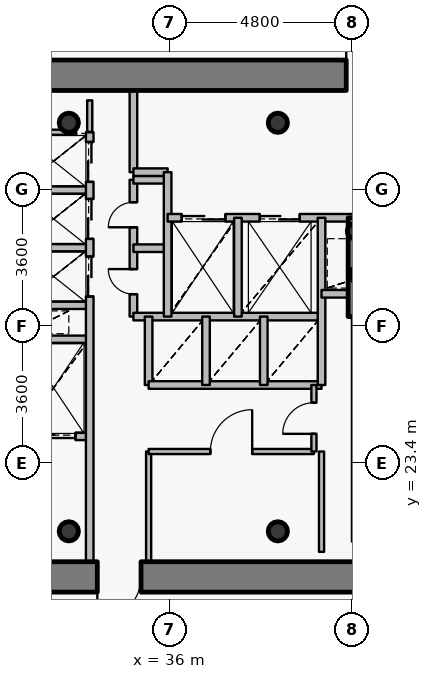
"""IFC4 building model, lengths in metres.
Left out: names, types, materials, properties, quantities, classifications, styles, units other than length and angle.
Written with IfcOpenShell. Run it as: python <this file> out.ifc"""

import sys

from ifc_helpers import new_model, si_unit, direction, frame, frame_2d, origin, origin_2d, place, context, subcontext, project, spatial, rectangle, hollow_circle, extrude, source, transform, mapped, element, fill, save


model = new_model("IFC4")
c1 = context("Model", 3, precision=1e-05, world=origin(), true_north=direction((0.0, 1.0)))
c2 = subcontext(c1, "Body", "Model", "MODEL_VIEW")
j1 = project(units=[si_unit("LENGTHUNIT", "METRE"), si_unit("PLANEANGLEUNIT", "RADIAN")], contexts=[c1])
p1 = place(None, origin())
s1 = spatial("IfcSite", under=j1, at=p1, CompositionType="ELEMENT")
p2 = place(p1, origin())
s2 = spatial("IfcBuilding", under=s1, at=p2, CompositionType="ELEMENT")
p3 = place(p2, frame((0.0, 0.0, 189.9)))
s3 = spatial("IfcBuildingStorey", under=s2, at=p3, CompositionType="ELEMENT", Elevation=189.9)
for number, where, z_axis, x_axis in (
    (1, (33.35, 21.6, 0.0), (0.0, 0.0, 1.0), (1.0, 0.0, 0.0)),
    (2, (38.85, 21.6, 0.0), (0.0, 0.0, 1.0), (1.0, 0.0, 0.0)),
    (3, (38.85, 32.35, 0.0), (0.0, 0.0, 1.0), (1.0, 0.0, 0.0)),
    (4, (33.35, 32.35, 0.0), (0.0, 0.0, 1.0), (1.0, 0.0, 0.0)),
):
    element("IfcColumn", number, at=place(p3, frame(where, z_axis=z_axis, x_axis=x_axis)), inside=s3, PredefinedType="COLUMN", context=c2, shape_type="SweptSolid", body=[
        extrude(hollow_circle(Radius=0.254, WallThickness=0.02, at=origin_2d()), origin(), (0.0, 0.0, 1.0), 3.75),
    ])
for number, where, z_axis, x_axis in (
    (5, (40.95, 28.35, 0.0), (0.0, 0.0, 1.0), (1.0, 0.0, 0.0)),
    (6, (40.88, 29.5, 0.0), (0.0, 0.0, 1.0), (1.0, 0.0, 0.0)),
):
    element("IfcColumn", number, at=place(p3, frame(where, z_axis=z_axis, x_axis=x_axis)), inside=s3, PredefinedType="COLUMN", context=c2, shape_type="SweptSolid", body=[
        extrude(hollow_circle(Radius=0.203, WallThickness=0.016, at=origin_2d()), origin(), (0.0, 0.0, 1.0), 3.75),
    ])
p4 = place(p3, frame((27.2, 33.6, 0.0), z_axis=(0.0, 0.0, 1.0), x_axis=(1.0, 0.0, 0.0)))
e7 = element("IfcWall", 7, at=p4, inside=s3, PredefinedType="SHEAR", context=c2, shape_type="SweptSolid", body=[
    extrude(rectangle(XDim=17.6, YDim=0.8, at=frame_2d((8.8, 0.0))), origin(), (0.0, 0.0, 1.0), 2.95),
])
p5 = place(p4, frame((13.45, 0.0, 0.0)))
e8 = element("IfcOpeningElement", 8, at=p5, cuts=e7, PredefinedType="OPENING", context=c2, shape_type="SweptSolid", body=[
    extrude(rectangle(XDim=1.15, YDim=2.15, at=origin_2d()), frame((0.575, 0.41, 1.075), z_axis=(0.0, -1.0, 0.0), x_axis=(1.0, 0.0, 0.0)), (0.0, 0.0, 1.0), 0.82),
])
p6 = place(p3, frame((44.8, 20.4, 0.0), z_axis=(0.0, 0.0, 1.0), x_axis=(-1.0, 0.0, 0.0)))
e9 = element("IfcWall", 9, at=p6, inside=s3, PredefinedType="SHEAR", context=c2, shape_type="SweptSolid", body=[
    extrude(rectangle(XDim=17.6, YDim=0.8, at=frame_2d((8.8, 0.0))), origin(), (0.0, 0.0, 1.0), 2.95),
])
p7 = place(p6, frame((9.55, 0.0, 0.0)))
e10 = element("IfcOpeningElement", 10, at=p7, cuts=e9, PredefinedType="OPENING", context=c2, shape_type="SweptSolid", body=[
    extrude(rectangle(XDim=1.15, YDim=2.15, at=origin_2d()), frame((0.575, 0.41, 1.075), z_axis=(0.0, -1.0, 0.0), x_axis=(1.0, 0.0, 0.0)), (0.0, 0.0, 1.0), 0.82),
])
p8 = place(p3, frame((40.9, 27.25, 0.0), z_axis=(0.0, 0.0, 1.0), x_axis=(0.0, 1.0, 0.0)))
e11 = element("IfcWall", 11, at=p8, inside=s3, PredefinedType="SHEAR", context=c2, shape_type="SweptSolid", body=[
    extrude(rectangle(XDim=2.6, YDim=0.4, at=frame_2d((1.3, 0.0))), origin(), (0.0, 0.0, 1.0), 3.1),
])
p9 = place(p3, frame((32.0, 24.1, 0.0), z_axis=(0.0, 0.0, 1.0), x_axis=(1.0, 0.0, 0.0)))
e12 = element("IfcWall", 12, at=p9, inside=s3, PredefinedType="PARTITIONING", context=c2, shape_type="SweptSolid", body=[
    extrude(rectangle(XDim=1.9, YDim=0.2, at=frame_2d((0.95, 0.0))), origin(), (0.0, 0.0, 1.0), 3.085),
])
p10 = place(p9, frame((0.375, 0.0, 0.0)))
e13 = element("IfcOpeningElement", 13, at=p10, cuts=e12, PredefinedType="OPENING", context=c2, shape_type="SweptSolid", body=[
    extrude(rectangle(XDim=1.15, YDim=2.15, at=origin_2d()), frame((0.575, 0.11, 1.075), z_axis=(0.0, -1.0, 0.0), x_axis=(1.0, 0.0, 0.0)), (0.0, 0.0, 1.0), 0.22),
])
for number, where, z_axis, x_axis in (
    (14, (32.0, 26.65, 0.0), (0.0, 0.0, 1.0), (1.0, 0.0, 0.0)),
    (15, (32.0, 27.55, 0.0), (0.0, 0.0, 1.0), (1.0, 0.0, 0.0)),
    (16, (32.0, 29.06, 0.0), (0.0, 0.0, 1.0), (1.0, 0.0, 0.0)),
    (17, (32.0, 30.58, 0.0), (0.0, 0.0, 1.0), (1.0, 0.0, 0.0)),
):
    element("IfcWall", number, at=place(p3, frame(where, z_axis=z_axis, x_axis=x_axis)), inside=s3, PredefinedType="PARTITIONING", context=c2, shape_type="SweptSolid", body=[
        extrude(rectangle(XDim=1.9, YDim=0.2, at=frame_2d((0.95, 0.0))), origin(), (0.0, 0.0, 1.0), 3.085),
    ])
p11 = place(p3, frame((33.9, 20.8, 0.0), z_axis=(0.0, 0.0, 1.0), x_axis=(0.0, 1.0, 0.0)))
e18 = element("IfcWall", 18, at=p11, inside=s3, PredefinedType="PARTITIONING", context=c2, shape_type="SweptSolid", body=[
    extrude(rectangle(XDim=11.3, YDim=0.2, at=frame_2d((5.65, 0.0))), origin(), (0.0, 0.0, 1.0), 3.085),
])
p12 = place(p11, frame((6.98, 0.0, 0.0)))
e19 = element("IfcOpeningElement", 19, at=p12, cuts=e18, PredefinedType="OPENING", context=c2, shape_type="SweptSolid", body=[
    extrude(rectangle(XDim=1.05, YDim=2.15, at=origin_2d()), frame((0.525, 0.11, 1.075), z_axis=(0.0, -1.0, 0.0), x_axis=(1.0, 0.0, 0.0)), (0.0, 0.0, 1.0), 0.22),
])
p13 = place(p11, frame((8.495, 0.0, 0.0)))
e20 = element("IfcOpeningElement", 20, at=p13, cuts=e18, PredefinedType="OPENING", context=c2, shape_type="SweptSolid", body=[
    extrude(rectangle(XDim=1.05, YDim=2.15, at=origin_2d()), frame((0.525, 0.11, 1.075), z_axis=(0.0, -1.0, 0.0), x_axis=(1.0, 0.0, 0.0)), (0.0, 0.0, 1.0), 0.22),
])
p14 = place(p11, frame((9.995, 0.0, 0.0)))
e21 = element("IfcOpeningElement", 21, at=p14, cuts=e18, PredefinedType="OPENING", context=c2, shape_type="SweptSolid", body=[
    extrude(rectangle(XDim=1.05, YDim=2.15, at=origin_2d()), frame((0.525, 0.11, 1.075), z_axis=(0.0, -1.0, 0.0), x_axis=(1.0, 0.0, 0.0)), (0.0, 0.0, 1.0), 0.22),
])
p15 = place(p3, frame((35.05, 27.25, 0.0), z_axis=(0.0, 0.0, 1.0), x_axis=(0.0, 1.0, 0.0)))
e22 = element("IfcWall", 22, at=p15, inside=s3, PredefinedType="PARTITIONING", context=c2, shape_type="SweptSolid", body=[
    extrude(rectangle(XDim=3.6, YDim=0.2, at=frame_2d((1.8, 0.0))), origin(), (0.0, 0.0, 1.0), 3.5),
])
p16 = place(p15, frame((0.59, 0.0, 0.0)))
e23 = element("IfcOpeningElement", 23, at=p16, cuts=e22, PredefinedType="OPENING", context=c2, shape_type="SweptSolid", body=[
    extrude(rectangle(XDim=0.66, YDim=2.05, at=origin_2d()), frame((0.33, 0.11, 1.025), z_axis=(0.0, -1.0, 0.0), x_axis=(1.0, 0.0, 0.0)), (0.0, 0.0, 1.0), 0.22),
])
p17 = place(p15, frame((2.35, 0.0, 0.0)))
e24 = element("IfcOpeningElement", 24, at=p17, cuts=e22, PredefinedType="OPENING", context=c2, shape_type="SweptSolid", body=[
    extrude(rectangle(XDim=0.66, YDim=2.05, at=origin_2d()), frame((0.33, 0.11, 1.025), z_axis=(0.0, -1.0, 0.0), x_axis=(1.0, 0.0, 0.0)), (0.0, 0.0, 1.0), 0.22),
])
p18 = place(p3, frame((35.05, 27.25, 0.0), z_axis=(0.0, 0.0, 1.0), x_axis=(1.0, 0.0, 0.0)))
e25 = element("IfcWall", 25, at=p18, inside=s3, PredefinedType="PARTITIONING", context=c2, shape_type="SweptSolid", body=[
    extrude(rectangle(XDim=4.95, YDim=0.2, at=frame_2d((2.475, 0.0))), origin(), (0.0, 0.0, 1.0), 3.085),
])
for number, where, z_axis, x_axis in (
    (26, (35.05, 29.05, 0.0), (0.0, 0.0, 1.0), (1.0, 0.0, 0.0)),
    (27, (35.05, 30.85, 0.0), (0.0, 0.0, 1.0), (1.0, 0.0, 0.0)),
):
    element("IfcWall", number, at=place(p3, frame(where, z_axis=z_axis, x_axis=x_axis)), inside=s3, PredefinedType="PARTITIONING", context=c2, shape_type="SweptSolid", body=[
        extrude(rectangle(XDim=0.9, YDim=0.2, at=frame_2d((0.45, 0.0))), origin(), (0.0, 0.0, 1.0), 3.5),
    ])
p19 = place(p3, frame((35.05, 31.05, 0.0), z_axis=(0.0, 0.0, 1.0), x_axis=(0.0, 1.0, 0.0)))
e28 = element("IfcWall", 28, at=p19, inside=s3, PredefinedType="PARTITIONING", context=c2, shape_type="SweptSolid", body=[
    extrude(rectangle(XDim=2.15, YDim=0.2, at=frame_2d((1.075, 0.0))), origin(), (0.0, 0.0, 1.0), 3.085),
])
p20 = place(p3, frame((35.05, 31.05, 0.0), z_axis=(0.0, 0.0, 1.0), x_axis=(1.0, 0.0, 0.0)))
e29 = element("IfcWall", 29, at=p20, inside=s3, PredefinedType="PARTITIONING", context=c2, shape_type="SweptSolid", body=[
    extrude(rectangle(XDim=0.9, YDim=0.2, at=frame_2d((0.45, 0.0))), origin(), (0.0, 0.0, 1.0), 3.5),
])
p21 = place(p3, frame((35.45, 20.8, 0.0), z_axis=(0.0, 0.0, 1.0), x_axis=(0.0, 1.0, 0.0)))
e30 = element("IfcWall", 30, at=p21, inside=s3, PredefinedType="PARTITIONING", context=c2, shape_type="SweptSolid", body=[
    extrude(rectangle(XDim=2.9, YDim=0.135, at=frame_2d((1.45, 0.0))), origin(), (0.0, 0.0, 1.0), 3.085),
])
p22 = place(p3, frame((35.45, 23.7, 0.0), z_axis=(0.0, 0.0, 1.0), x_axis=(1.0, 0.0, 0.0)))
e31 = element("IfcWall", 31, at=p22, inside=s3, PredefinedType="PARTITIONING", context=c2, shape_type="SweptSolid", body=[
    extrude(rectangle(XDim=4.35, YDim=0.135, at=frame_2d((2.175, 0.0))), origin(), (0.0, 0.0, 1.0), 3.085),
])
p23 = place(p22, frame((1.625, 0.0, 0.0)))
e32 = element("IfcOpeningElement", 32, at=p23, cuts=e31, PredefinedType="OPENING", context=c2, shape_type="SweptSolid", body=[
    extrude(rectangle(XDim=1.1, YDim=2.15, at=origin_2d()), frame((0.55, 0.078, 1.075), z_axis=(0.0, -1.0, 0.0), x_axis=(1.0, 0.0, 0.0)), (0.0, 0.0, 1.0), 0.155),
])
p24 = place(p3, frame((35.45, 25.45, 0.0), z_axis=(0.0, 0.0, 1.0), x_axis=(0.0, 1.0, 0.0)))
e33 = element("IfcWall", 33, at=p24, inside=s3, PredefinedType="PARTITIONING", context=c2, shape_type="SweptSolid", body=[
    extrude(rectangle(XDim=1.8, YDim=0.2, at=frame_2d((0.9, 0.0))), origin(), (0.0, 0.0, 1.0), 3.5),
])
p25 = place(p3, frame((35.45, 25.45, 0.0), z_axis=(0.0, 0.0, 1.0), x_axis=(1.0, 0.0, 0.0)))
e34 = element("IfcWall", 34, at=p25, inside=s3, PredefinedType="PARTITIONING", context=c2, shape_type="SweptSolid", body=[
    extrude(rectangle(XDim=4.55, YDim=0.2, at=frame_2d((2.275, 0.0))), origin(), (0.0, 0.0, 1.0), 3.085),
])
p26 = place(p3, frame((35.95, 27.25, 0.0), z_axis=(0.0, 0.0, 1.0), x_axis=(0.0, 1.0, 0.0)))
e35 = element("IfcWall", 35, at=p26, inside=s3, PredefinedType="PARTITIONING", context=c2, shape_type="SweptSolid", body=[
    extrude(rectangle(XDim=3.8, YDim=0.2, at=frame_2d((1.9, 0.0))), origin(), (0.0, 0.0, 1.0), 3.5),
])
p27 = place(p3, frame((35.95, 29.85, 0.0), z_axis=(0.0, 0.0, 1.0), x_axis=(1.0, 0.0, 0.0)))
e36 = element("IfcWall", 36, at=p27, inside=s3, PredefinedType="PARTITIONING", context=c2, shape_type="SweptSolid", body=[
    extrude(rectangle(XDim=8.49, YDim=0.2, at=frame_2d((4.245, 0.0))), origin(), (0.0, 0.0, 1.0), 3.085),
])
p28 = place(p27, frame((6.1, 0.0, 0.0)))
e37 = element("IfcOpeningElement", 37, at=p28, cuts=e36, PredefinedType="OPENING", context=c2, shape_type="SweptSolid", body=[
    extrude(rectangle(XDim=1.2, YDim=2.15, at=origin_2d()), frame((0.6, 0.11, 1.075), z_axis=(0.0, -1.0, 0.0), x_axis=(1.0, 0.0, 0.0)), (0.0, 0.0, 1.0), 0.22),
])
p29 = place(p27, frame((0.37, 0.0, 0.0)))
e38 = element("IfcOpeningElement", 38, at=p29, cuts=e36, PredefinedType="OPENING", context=c2, shape_type="SweptSolid", body=[
    extrude(rectangle(XDim=1.15, YDim=2.15, at=origin_2d()), frame((0.575, 0.11, 1.075), z_axis=(0.0, -1.0, 0.0), x_axis=(1.0, 0.0, 0.0)), (0.0, 0.0, 1.0), 0.22),
])
p30 = place(p27, frame((2.425, 0.0, 0.0)))
e39 = element("IfcOpeningElement", 39, at=p30, cuts=e36, PredefinedType="OPENING", context=c2, shape_type="SweptSolid", body=[
    extrude(rectangle(XDim=1.05, YDim=2.15, at=origin_2d()), frame((0.525, 0.11, 1.075), z_axis=(0.0, -1.0, 0.0), x_axis=(1.0, 0.0, 0.0)), (0.0, 0.0, 1.0), 0.22),
])
p31 = place(p3, frame((36.96, 25.45, 0.0), z_axis=(0.0, 0.0, 1.0), x_axis=(0.0, 1.0, 0.0)))
e40 = element("IfcWall", 40, at=p31, inside=s3, PredefinedType="PARTITIONING", context=c2, shape_type="SweptSolid", body=[
    extrude(rectangle(XDim=1.8, YDim=0.2, at=frame_2d((0.9, 0.0))), origin(), (0.0, 0.0, 1.0), 3.5),
])
p32 = place(p3, frame((37.8, 27.25, 0.0), z_axis=(0.0, 0.0, 1.0), x_axis=(0.0, 1.0, 0.0)))
e41 = element("IfcWall", 41, at=p32, inside=s3, PredefinedType="PARTITIONING", context=c2, shape_type="SweptSolid", body=[
    extrude(rectangle(XDim=2.6, YDim=0.2, at=frame_2d((1.3, 0.0))), origin(), (0.0, 0.0, 1.0), 3.5),
])
p33 = place(p3, frame((38.48, 25.45, 0.0), z_axis=(0.0, 0.0, 1.0), x_axis=(0.0, 1.0, 0.0)))
e42 = element("IfcWall", 42, at=p33, inside=s3, PredefinedType="PARTITIONING", context=c2, shape_type="SweptSolid", body=[
    extrude(rectangle(XDim=1.8, YDim=0.2, at=frame_2d((0.9, 0.0))), origin(), (0.0, 0.0, 1.0), 3.5),
])
p34 = place(p3, frame((39.8, 23.7, 0.0), z_axis=(0.0, 0.0, 1.0), x_axis=(0.0, 1.0, 0.0)))
e43 = element("IfcWall", 43, at=p34, inside=s3, PredefinedType="PARTITIONING", context=c2, shape_type="SweptSolid", body=[
    extrude(rectangle(XDim=1.75, YDim=0.135, at=frame_2d((0.875, 0.0))), origin(), (0.0, 0.0, 1.0), 3.5),
])
p35 = place(p34, frame((0.465, 0.0, 0.0)))
e44 = element("IfcOpeningElement", 44, at=p35, cuts=e43, PredefinedType="OPENING", context=c2, shape_type="SweptSolid", body=[
    extrude(rectangle(XDim=0.82, YDim=2.1, at=origin_2d()), frame((0.41, 0.078, 1.05), z_axis=(0.0, -1.0, 0.0), x_axis=(1.0, 0.0, 0.0)), (0.0, 0.0, 1.0), 0.155),
])
p36 = place(p3, frame((40.0, 25.45, 0.0), z_axis=(0.0, 0.0, 1.0), x_axis=(0.0, 1.0, 0.0)))
e45 = element("IfcWall", 45, at=p36, inside=s3, PredefinedType="PARTITIONING", context=c2, shape_type="SweptSolid", body=[
    extrude(rectangle(XDim=4.4, YDim=0.2, at=frame_2d((2.2, 0.0))), origin(), (0.0, 0.0, 1.0), 3.5),
])
p37 = place(p3, frame((40.0, 27.85, 0.0), z_axis=(0.0, 0.0, 1.0), x_axis=(1.0, 0.0, 0.0)))
e46 = element("IfcWall", 46, at=p37, inside=s3, PredefinedType="PARTITIONING", context=c2, shape_type="SweptSolid", body=[
    extrude(rectangle(XDim=0.9, YDim=0.2, at=frame_2d((0.45, 0.0))), origin(), (0.0, 0.0, 1.0), 3.5),
])
p38 = place(p3, frame((40.9, 21.33, 0.0), z_axis=(0.0, 0.0, 1.0), x_axis=(0.0, 1.0, 0.0)))
e47 = element("IfcWall", 47, at=p38, inside=s3, PredefinedType="PARTITIONING", context=c2, shape_type="SweptSolid", body=[
    extrude(rectangle(XDim=5.91, YDim=0.2, at=frame_2d((2.955, 0.0))), origin(), (0.0, 0.0, 1.0), 3.035),
])
p39 = place(p3, frame((32.36, 32.1, 0.0), z_axis=(0.0, 0.0, 1.0), x_axis=(1.0, 0.0, 0.0)))
e48 = element("IfcWall", 48, at=p39, inside=s3, PredefinedType="PARTITIONING", context=c2, shape_type="SweptSolid", body=[
    extrude(rectangle(XDim=1.18, YDim=0.135, at=frame_2d((0.59, 0.0))), origin(), (0.0, 0.0, 1.0), 3.085),
])
p40 = place(p3, frame((40.0, 23.7, 0.0), z_axis=(0.0, 0.0, 1.0), x_axis=(0.0, -1.0, 0.0)))
e49 = element("IfcWall", 49, at=p40, inside=s3, PredefinedType="PARTITIONING", context=c2, shape_type="SweptSolid", body=[
    extrude(rectangle(XDim=2.64, YDim=0.135, at=frame_2d((1.32, 0.0))), origin(), (0.0, 0.0, 1.0), 3.035),
])
p41 = place(p3, frame((33.9, 32.11, 0.0), z_axis=(0.0, 0.0, 1.0), x_axis=(0.0, 1.0, 0.0)))
e50 = element("IfcWall", 50, at=p41, inside=s3, PredefinedType="PARTITIONING", context=c2, shape_type="SweptSolid", body=[
    extrude(rectangle(XDim=0.83, YDim=0.135, at=frame_2d((0.415, 0.0))), origin(), (0.0, 0.0, 1.0), 3.085),
])
m1 = source(origin(), c2, "Body", "SweptSolid", [
    extrude(rectangle(XDim=1.15, YDim=2.15, at=origin_2d()), frame((0.575, 0.025, 1.075), z_axis=(0.0, -1.0, 0.0), x_axis=(1.0, 0.0, 0.0)), (0.0, 0.0, 1.0), 0.05),
])
p42 = place(p5, origin())
e51 = element("IfcDoor", 51, at=p42, inside=s3, OperationType="SINGLE_SWING_LEFT", PredefinedType="DOOR", context=c2, shape_type="MappedRepresentation", body=[
    mapped(m1, transform((0.0, 0.0, 0.0), x_axis=(1.0, 0.0, 0.0), y_axis=(0.0, 1.0, 0.0), z_axis=(0.0, 0.0, 1.0), scale=1.0)),
])
fill(e8, e51)
p43 = place(p7, origin())
e52 = element("IfcDoor", 52, at=p43, inside=s3, OperationType="SINGLE_SWING_RIGHT", PredefinedType="DOOR", context=c2, shape_type="MappedRepresentation", body=[
    mapped(m1, transform((0.0, 0.0, 0.0), x_axis=(1.0, 0.0, 0.0), y_axis=(0.0, 1.0, 0.0), z_axis=(0.0, 0.0, 1.0), scale=1.0)),
])
fill(e10, e52)
m2 = source(origin(), c2, "Body", "SweptSolid", [
    extrude(rectangle(XDim=1.15, YDim=2.15, at=origin_2d()), frame((0.575, 0.025, 1.075), z_axis=(0.0, -1.0, 0.0), x_axis=(1.0, 0.0, 0.0)), (0.0, 0.0, 1.0), 0.05),
])
p44 = place(p29, origin())
e53 = element("IfcDoor", 53, at=p44, inside=s3, OperationType="DOUBLE_DOOR_SLIDING", PredefinedType="USERDEFINED", context=c2, shape_type="MappedRepresentation", body=[
    mapped(m2, transform((0.0, 0.0, 0.0), x_axis=(1.0, 0.0, 0.0), y_axis=(0.0, 1.0, 0.0), z_axis=(0.0, 0.0, 1.0), scale=1.0)),
])
fill(e38, e53)
p45 = place(p10, origin())
e54 = element("IfcDoor", 54, at=p45, inside=s3, OperationType="DOUBLE_DOOR_SLIDING", PredefinedType="USERDEFINED", context=c2, shape_type="MappedRepresentation", body=[
    mapped(m2, transform((0.0, 0.0, 0.0), x_axis=(1.0, 0.0, 0.0), y_axis=(0.0, 1.0, 0.0), z_axis=(0.0, 0.0, 1.0), scale=1.0)),
])
fill(e13, e54)
m3 = source(origin(), c2, "Body", "SweptSolid", [
    extrude(rectangle(XDim=1.05, YDim=2.15, at=origin_2d()), frame((0.525, 0.025, 1.075), z_axis=(0.0, -1.0, 0.0), x_axis=(1.0, 0.0, 0.0)), (0.0, 0.0, 1.0), 0.05),
])
p46 = place(p30, origin())
e55 = element("IfcDoor", 55, at=p46, inside=s3, OperationType="DOUBLE_DOOR_SLIDING", PredefinedType="USERDEFINED", context=c2, shape_type="MappedRepresentation", body=[
    mapped(m3, transform((0.0, 0.0, 0.0), x_axis=(1.0, 0.0, 0.0), y_axis=(0.0, 1.0, 0.0), z_axis=(0.0, 0.0, 1.0), scale=1.0)),
])
fill(e39, e55)
p47 = place(p12, origin())
e56 = element("IfcDoor", 56, at=p47, inside=s3, OperationType="DOUBLE_DOOR_SLIDING", PredefinedType="USERDEFINED", context=c2, shape_type="MappedRepresentation", body=[
    mapped(m3, transform((0.0, 0.0, 0.0), x_axis=(1.0, 0.0, 0.0), y_axis=(0.0, 1.0, 0.0), z_axis=(0.0, 0.0, 1.0), scale=1.0)),
])
fill(e19, e56)
p48 = place(p13, origin())
e57 = element("IfcDoor", 57, at=p48, inside=s3, OperationType="DOUBLE_DOOR_SLIDING", PredefinedType="USERDEFINED", context=c2, shape_type="MappedRepresentation", body=[
    mapped(m3, transform((0.0, 0.0, 0.0), x_axis=(1.0, 0.0, 0.0), y_axis=(0.0, 1.0, 0.0), z_axis=(0.0, 0.0, 1.0), scale=1.0)),
])
fill(e20, e57)
p49 = place(p14, origin())
e58 = element("IfcDoor", 58, at=p49, inside=s3, OperationType="DOUBLE_DOOR_SLIDING", PredefinedType="USERDEFINED", context=c2, shape_type="MappedRepresentation", body=[
    mapped(m3, transform((0.0, 0.0, 0.0), x_axis=(1.0, 0.0, 0.0), y_axis=(0.0, 1.0, 0.0), z_axis=(0.0, 0.0, 1.0), scale=1.0)),
])
fill(e21, e58)
m4 = source(origin(), c2, "Body", "SweptSolid", [
    extrude(rectangle(XDim=0.66, YDim=2.05, at=origin_2d()), frame((0.33, 0.025, 1.025), z_axis=(0.0, -1.0, 0.0), x_axis=(1.0, 0.0, 0.0)), (0.0, 0.0, 1.0), 0.05),
])
p50 = place(p16, origin())
e59 = element("IfcDoor", 59, at=p50, inside=s3, OperationType="SINGLE_SWING_RIGHT", PredefinedType="USERDEFINED", context=c2, shape_type="MappedRepresentation", body=[
    mapped(m4, transform((0.0, 0.0, 0.0), x_axis=(1.0, 0.0, 0.0), y_axis=(0.0, 1.0, 0.0), z_axis=(0.0, 0.0, 1.0), scale=1.0)),
])
fill(e23, e59)
p51 = place(p17, origin())
e60 = element("IfcDoor", 60, at=p51, inside=s3, OperationType="SINGLE_SWING_LEFT", PredefinedType="USERDEFINED", context=c2, shape_type="MappedRepresentation", body=[
    mapped(m4, transform((0.0, 0.0, 0.0), x_axis=(1.0, 0.0, 0.0), y_axis=(0.0, 1.0, 0.0), z_axis=(0.0, 0.0, 1.0), scale=1.0)),
])
fill(e24, e60)
m5 = source(origin(), c2, "Body", "SweptSolid", [
    extrude(rectangle(XDim=1.1, YDim=2.15, at=origin_2d()), frame((0.55, 0.025, 1.075), z_axis=(0.0, -1.0, 0.0), x_axis=(1.0, 0.0, 0.0)), (0.0, 0.0, 1.0), 0.05),
])
p52 = place(p23, origin())
e61 = element("IfcDoor", 61, at=p52, inside=s3, OperationType="SINGLE_SWING_RIGHT", PredefinedType="DOOR", context=c2, shape_type="MappedRepresentation", body=[
    mapped(m5, transform((0.0, 0.0, 0.0), x_axis=(1.0, 0.0, 0.0), y_axis=(0.0, 1.0, 0.0), z_axis=(0.0, 0.0, 1.0), scale=1.0)),
])
fill(e32, e61)
m6 = source(origin(), c2, "Body", "SweptSolid", [
    extrude(rectangle(XDim=0.82, YDim=2.1, at=origin_2d()), frame((0.41, 0.025, 1.05), z_axis=(0.0, -1.0, 0.0), x_axis=(1.0, 0.0, 0.0)), (0.0, 0.0, 1.0), 0.05),
])
p53 = place(p35, origin())
e62 = element("IfcDoor", 62, at=p53, inside=s3, OperationType="SINGLE_SWING_LEFT", PredefinedType="DOOR", context=c2, shape_type="MappedRepresentation", body=[
    mapped(m6, transform((0.0, 0.0, 0.0), x_axis=(1.0, 0.0, 0.0), y_axis=(0.0, 1.0, 0.0), z_axis=(0.0, 0.0, 1.0), scale=1.0)),
])
fill(e44, e62)
save(model, sys.argv[1])
